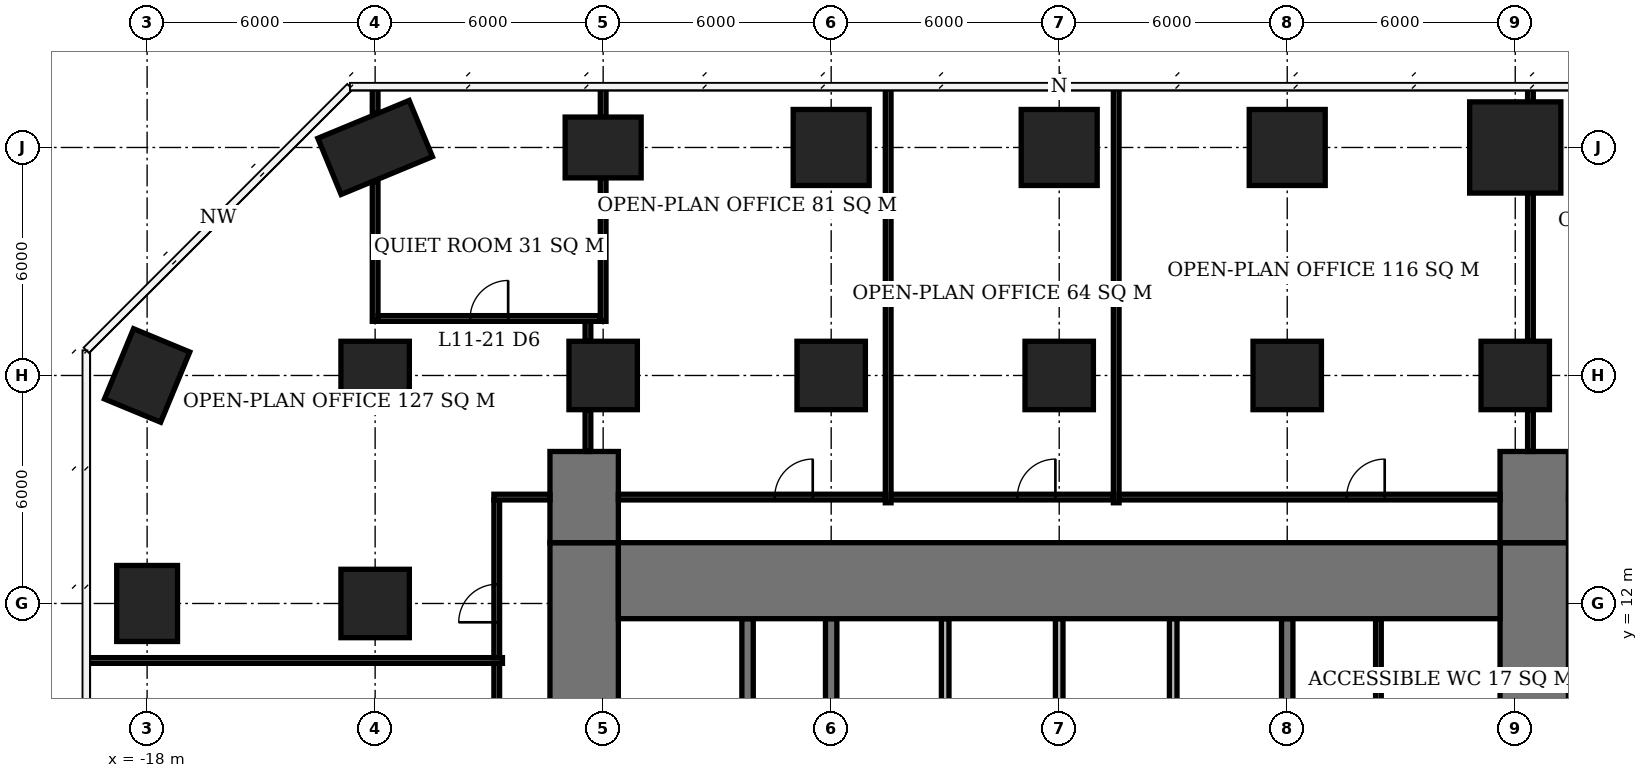
"""IFC4 building model, lengths in metres.
Left out: names, types, materials, properties, quantities, classifications, styles, units other than length and angle.
Written with IfcOpenShell. Run it as: python <this file> out.ifc"""

import sys

from ifc_helpers import new_model, si_unit, direction, frame, frame_2d, origin, origin_2d, place, context, subcontext, project, spatial, rectangle, extrude, element, fill, save


model = new_model("IFC4")
c1 = context("Model", 3, precision=1e-05, world=origin(), true_north=direction((0.0, 1.0)))
c2 = subcontext(c1, "Body", "Model", "MODEL_VIEW")
j1 = project(units=[si_unit("LENGTHUNIT", "METRE"), si_unit("PLANEANGLEUNIT", "RADIAN")], contexts=[c1])
p1 = place(None, origin())
s1 = spatial("IfcSite", under=j1, at=p1, CompositionType="ELEMENT")
p2 = place(p1, origin())
s2 = spatial("IfcBuilding", under=s1, at=p2, CompositionType="ELEMENT")
p3 = place(p2, frame((0.0, 0.0, 49.4)))
s3 = spatial("IfcBuildingStorey", under=s2, at=p3, CompositionType="ELEMENT", Elevation=49.4)
for number, where, z_axis, x_axis in (
    (1, (-18.0, 12.0, 0.0), (0.0, 0.0, 1.0), (0.0, 1.0, 0.0)),
    (2, (-18.0, 18.0, 0.0), (0.0, 0.0, 1.0), (0.383, 0.924, 0.0)),
):
    element("IfcColumn", number, at=place(p3, frame(where, z_axis=z_axis, x_axis=x_axis)), inside=s3, PredefinedType="COLUMN", context=c2, shape_type="SweptSolid", body=[
        extrude(rectangle(XDim=2.0, YDim=1.6, at=origin_2d()), origin(), (0.0, 0.0, 1.0), 3.9),
    ])
for number, where, z_axis, x_axis in (
    (3, (-12.0, 12.0, 0.0), (0.0, 0.0, 1.0), (1.0, 0.0, 0.0)),
    (4, (-12.0, 18.0, 0.0), (0.0, 0.0, 1.0), (1.0, 0.0, 0.0)),
):
    element("IfcColumn", number, at=place(p3, frame(where, z_axis=z_axis, x_axis=x_axis)), inside=s3, PredefinedType="COLUMN", context=c2, shape_type="SweptSolid", body=[
        extrude(rectangle(XDim=1.8, YDim=1.8, at=origin_2d()), origin(), (0.0, 0.0, 1.0), 3.9),
    ])
p4 = place(p3, frame((-12.0, 24.0, 0.0), z_axis=(0.0, 0.0, 1.0), x_axis=(0.923879532511, 0.382683432365, 0.0)))
e5 = element("IfcColumn", 5, at=p4, inside=s3, PredefinedType="COLUMN", context=c2, shape_type="SweptSolid", body=[
    extrude(rectangle(XDim=2.6, YDim=1.6, at=origin_2d()), origin(), (0.0, 0.0, 1.0), 3.9),
])
p5 = place(p3, frame((-6.0, 18.0, 0.0), z_axis=(0.0, 0.0, 1.0), x_axis=(1.0, 0.0, 0.0)))
e6 = element("IfcColumn", 6, at=p5, inside=s3, PredefinedType="COLUMN", context=c2, shape_type="SweptSolid", body=[
    extrude(rectangle(XDim=1.8, YDim=1.8, at=origin_2d()), origin(), (0.0, 0.0, 1.0), 3.9),
])
p6 = place(p3, frame((-6.0, 24.0, 0.0), z_axis=(0.0, 0.0, 1.0), x_axis=(1.0, 0.0, 0.0)))
e7 = element("IfcColumn", 7, at=p6, inside=s3, PredefinedType="COLUMN", context=c2, shape_type="SweptSolid", body=[
    extrude(rectangle(XDim=2.0, YDim=1.6, at=origin_2d()), origin(), (0.0, 0.0, 1.0), 3.9),
])
p7 = place(p3, frame((0.0, 18.0, 0.0), z_axis=(0.0, 0.0, 1.0), x_axis=(1.0, 0.0, 0.0)))
e8 = element("IfcColumn", 8, at=p7, inside=s3, PredefinedType="COLUMN", context=c2, shape_type="SweptSolid", body=[
    extrude(rectangle(XDim=1.8, YDim=1.8, at=origin_2d()), origin(), (0.0, 0.0, 1.0), 3.9),
])
p8 = place(p3, frame((0.0, 24.0, 0.0), z_axis=(0.0, 0.0, 1.0), x_axis=(1.0, 0.0, 0.0)))
e9 = element("IfcColumn", 9, at=p8, inside=s3, PredefinedType="COLUMN", context=c2, shape_type="SweptSolid", body=[
    extrude(rectangle(XDim=2.0, YDim=2.0, at=origin_2d()), origin(), (0.0, 0.0, 1.0), 3.9),
])
p9 = place(p3, frame((6.0, 18.0, 0.0), z_axis=(0.0, 0.0, 1.0), x_axis=(1.0, 0.0, 0.0)))
e10 = element("IfcColumn", 10, at=p9, inside=s3, PredefinedType="COLUMN", context=c2, shape_type="SweptSolid", body=[
    extrude(rectangle(XDim=1.8, YDim=1.8, at=origin_2d()), origin(), (0.0, 0.0, 1.0), 3.9),
])
p10 = place(p3, frame((6.0, 24.0, 0.0), z_axis=(0.0, 0.0, 1.0), x_axis=(1.0, 0.0, 0.0)))
e11 = element("IfcColumn", 11, at=p10, inside=s3, PredefinedType="COLUMN", context=c2, shape_type="SweptSolid", body=[
    extrude(rectangle(XDim=2.0, YDim=2.0, at=origin_2d()), origin(), (0.0, 0.0, 1.0), 3.9),
])
p11 = place(p3, frame((12.0, 18.0, 0.0), z_axis=(0.0, 0.0, 1.0), x_axis=(1.0, 0.0, 0.0)))
e12 = element("IfcColumn", 12, at=p11, inside=s3, PredefinedType="COLUMN", context=c2, shape_type="SweptSolid", body=[
    extrude(rectangle(XDim=1.8, YDim=1.8, at=origin_2d()), origin(), (0.0, 0.0, 1.0), 3.9),
])
p12 = place(p3, frame((12.0, 24.0, 0.0), z_axis=(0.0, 0.0, 1.0), x_axis=(1.0, 0.0, 0.0)))
e13 = element("IfcColumn", 13, at=p12, inside=s3, PredefinedType="COLUMN", context=c2, shape_type="SweptSolid", body=[
    extrude(rectangle(XDim=2.0, YDim=2.0, at=origin_2d()), origin(), (0.0, 0.0, 1.0), 3.9),
])
p13 = place(p3, frame((18.0, 18.0, 0.0), z_axis=(0.0, 0.0, 1.0), x_axis=(1.0, 0.0, 0.0)))
e14 = element("IfcColumn", 14, at=p13, inside=s3, PredefinedType="COLUMN", context=c2, shape_type="SweptSolid", body=[
    extrude(rectangle(XDim=1.8, YDim=1.8, at=origin_2d()), origin(), (0.0, 0.0, 1.0), 3.9),
])
p14 = place(p3, frame((18.0, 24.0, 0.0), z_axis=(0.0, 0.0, 1.0), x_axis=(1.0, 0.0, 0.0)))
e15 = element("IfcColumn", 15, at=p14, inside=s3, PredefinedType="COLUMN", context=c2, shape_type="SweptSolid", body=[
    extrude(rectangle(XDim=2.4, YDim=2.4, at=origin_2d()), origin(), (0.0, 0.0, 1.0), 3.9),
])
p15 = place(p3, frame((-5.6, 12.6, 0.0), z_axis=(0.0, 0.0, 1.0), x_axis=(1.0, 0.0, 0.0)))
e16 = element("IfcWall", 16, at=p15, inside=s3, PredefinedType="SHEAR", context=c2, shape_type="SweptSolid", body=[
    extrude(rectangle(XDim=23.2, YDim=2.0, at=frame_2d((11.6, 0.0))), origin(), (0.0, 0.0, 1.0), 3.9),
])
p16 = place(p3, frame((-6.5, -7.6, 0.0), z_axis=(0.0, 0.0, 1.0), x_axis=(0.0, 1.0, 0.0)))
e17 = element("IfcWall", 17, at=p16, inside=s3, PredefinedType="SHEAR", context=c2, shape_type="SweptSolid", body=[
    extrude(rectangle(XDim=21.2, YDim=1.8, at=frame_2d((10.6, 0.0))), origin(), (0.0, 0.0, 1.0), 3.9),
])
p17 = place(p16, frame((7.8, 0.0, 0.0)))
e18 = element("IfcOpeningElement", 18, at=p17, cuts=e17, PredefinedType="OPENING", context=c2, shape_type="SweptSolid", body=[
    extrude(rectangle(XDim=1.8, YDim=2.4, at=frame_2d((0.9, 1.2))), frame((0.0, 0.91, 0.0), z_axis=(0.0, -1.0, 0.0), x_axis=(1.0, 0.0, 0.0)), (0.0, 0.0, 1.0), 1.82),
])
p18 = place(p3, frame((18.5, -7.6, 0.0), z_axis=(0.0, 0.0, 1.0), x_axis=(0.0, 1.0, 0.0)))
e19 = element("IfcWall", 19, at=p18, inside=s3, PredefinedType="SHEAR", context=c2, shape_type="SweptSolid", body=[
    extrude(rectangle(XDim=21.2, YDim=1.8, at=frame_2d((10.6, 0.0))), origin(), (0.0, 0.0, 1.0), 3.9),
])
p19 = place(p18, frame((9.2, 0.0, 0.0)))
e20 = element("IfcOpeningElement", 20, at=p19, cuts=e19, PredefinedType="OPENING", context=c2, shape_type="SweptSolid", body=[
    extrude(rectangle(XDim=1.8, YDim=2.4, at=frame_2d((0.9, 1.2))), frame((0.0, 0.91, 0.0), z_axis=(0.0, -1.0, 0.0), x_axis=(1.0, 0.0, 0.0)), (0.0, 0.0, 1.0), 1.82),
])
for number, where, z_axis, x_axis in (
    (21, (-6.5, 13.6, 0.0), (0.0, 0.0, 1.0), (0.0, 1.0, 0.0)),
    (22, (18.5, 13.6, 0.0), (0.0, 0.0, 1.0), (0.0, 1.0, 0.0)),
):
    element("IfcWall", number, at=place(p3, frame(where, z_axis=z_axis, x_axis=x_axis)), inside=s3, PredefinedType="SHEAR", context=c2, shape_type="SweptSolid", body=[
        extrude(rectangle(XDim=2.4, YDim=1.8, at=frame_2d((1.2, 0.0))), origin(), (0.0, 0.0, 1.0), 3.9),
    ])
p20 = place(p3, frame((0.0, 3.15, 0.0), z_axis=(0.0, 0.0, 1.0), x_axis=(0.0, 1.0, 0.0)))
e23 = element("IfcWall", 23, at=p20, inside=s3, PredefinedType="SHEAR", context=c2, shape_type="SweptSolid", body=[
    extrude(rectangle(XDim=8.45, YDim=0.3, at=frame_2d((4.225, 0.0))), origin(), (0.0, 0.0, 1.0), 3.9),
])
p21 = place(p3, frame((12.0, 6.15, 0.0), z_axis=(0.0, 0.0, 1.0), x_axis=(0.0, 1.0, 0.0)))
e24 = element("IfcWall", 24, at=p21, inside=s3, PredefinedType="SHEAR", context=c2, shape_type="SweptSolid", body=[
    extrude(rectangle(XDim=5.45, YDim=0.3, at=frame_2d((2.725, 0.0))), origin(), (0.0, 0.0, 1.0), 3.9),
])
p22 = place(p3, frame((-2.2, 3.15, 0.0), z_axis=(0.0, 0.0, 1.0), x_axis=(0.0, 1.0, 0.0)))
e25 = element("IfcWall", 25, at=p22, inside=s3, PredefinedType="SHEAR", context=c2, shape_type="SweptSolid", body=[
    extrude(rectangle(XDim=8.45, YDim=0.3, at=frame_2d((4.225, 0.0))), origin(), (0.0, 0.0, 1.0), 3.9),
])
for number, where, z_axis, x_axis in (
    (26, (3.0, 6.15, 0.0), (0.0, 0.0, 1.0), (0.0, 1.0, 0.0)),
    (27, (6.0, 6.15, 0.0), (0.0, 0.0, 1.0), (0.0, 1.0, 0.0)),
    (28, (9.0, 6.15, 0.0), (0.0, 0.0, 1.0), (0.0, 1.0, 0.0)),
):
    element("IfcWall", number, at=place(p3, frame(where, z_axis=z_axis, x_axis=x_axis)), inside=s3, PredefinedType="SOLIDWALL", context=c2, shape_type="SweptSolid", body=[
        extrude(rectangle(XDim=5.45, YDim=0.2, at=frame_2d((2.725, 0.0))), origin(), (0.0, 0.0, 1.0), 3.9),
    ])
p23 = place(p3, frame((14.4, 6.15, 0.0), z_axis=(0.0, 0.0, 1.0), x_axis=(0.0, 1.0, 0.0)))
e29 = element("IfcWall", 29, at=p23, inside=s3, PredefinedType="PLUMBINGWALL", context=c2, shape_type="SweptSolid", body=[
    extrude(rectangle(XDim=5.45, YDim=0.15, at=frame_2d((2.725, 0.0))), origin(), (0.0, 0.0, 1.0), 3.65),
])
p24 = place(p3, frame((-11.925, 19.5, 0.0), z_axis=(0.0, 0.0, 1.0), x_axis=(1.0, 0.0, 0.0)))
e30 = element("IfcWall", 30, at=p24, inside=s3, PredefinedType="PARTITIONING", context=c2, shape_type="SweptSolid", body=[
    extrude(rectangle(XDim=5.85, YDim=0.15, at=frame_2d((2.925, 0.0))), origin(), (0.0, 0.0, 1.0), 3.65),
])
p25 = place(p24, frame((2.425, 0.0, 0.0)))
e31 = element("IfcOpeningElement", 31, at=p25, cuts=e30, PredefinedType="OPENING", context=c2, shape_type="SweptSolid", body=[
    extrude(rectangle(XDim=1.0, YDim=2.1, at=frame_2d((0.5, 1.05))), frame((0.0, 0.085, 0.0), z_axis=(0.0, -1.0, 0.0), x_axis=(1.0, 0.0, 0.0)), (0.0, 0.0, 1.0), 0.17),
])
p26 = place(p3, frame((-12.0, 19.425, 0.0), z_axis=(0.0, 0.0, 1.0), x_axis=(0.0, 1.0, 0.0)))
e32 = element("IfcWall", 32, at=p26, inside=s3, PredefinedType="PARTITIONING", context=c2, shape_type="SweptSolid", body=[
    extrude(rectangle(XDim=3.678, YDim=0.15, at=frame_2d((1.839, 0.0))), origin(), (0.0, 0.0, 1.0), 3.65),
])
p27 = place(p3, frame((-12.0, 24.897, 0.0), z_axis=(0.0, 0.0, 1.0), x_axis=(0.0, 1.0, 0.0)))
e33 = element("IfcWall", 33, at=p27, inside=s3, PredefinedType="PARTITIONING", context=c2, shape_type="SweptSolid", body=[
    extrude(rectangle(XDim=0.703, YDim=0.15, at=frame_2d((0.352, 0.0))), origin(), (0.0, 0.0, 1.0), 3.65),
])
p28 = place(p3, frame((-6.0, 19.425, 0.0), z_axis=(0.0, 0.0, 1.0), x_axis=(0.0, 1.0, 0.0)))
e34 = element("IfcWall", 34, at=p28, inside=s3, PredefinedType="PARTITIONING", context=c2, shape_type="SweptSolid", body=[
    extrude(rectangle(XDim=3.775, YDim=0.15, at=frame_2d((1.887, 0.0))), origin(), (0.0, 0.0, 1.0), 3.65),
])
p29 = place(p3, frame((-6.0, 24.8, 0.0), z_axis=(0.0, 0.0, 1.0), x_axis=(0.0, 1.0, 0.0)))
e35 = element("IfcWall", 35, at=p29, inside=s3, PredefinedType="PARTITIONING", context=c2, shape_type="SweptSolid", body=[
    extrude(rectangle(XDim=0.8, YDim=0.15, at=frame_2d((0.4, 0.0))), origin(), (0.0, 0.0, 1.0), 3.65),
])
p30 = place(p3, frame((-19.6, 10.5, 0.0), z_axis=(0.0, 0.0, 1.0), x_axis=(1.0, 0.0, 0.0)))
e36 = element("IfcWall", 36, at=p30, inside=s3, PredefinedType="PARTITIONING", context=c2, shape_type="SweptSolid", body=[
    extrude(rectangle(XDim=10.95, YDim=0.15, at=frame_2d((5.475, 0.0))), origin(), (0.0, 0.0, 1.0), 3.65),
])
p31 = place(p3, frame((-8.8, 4.575, 0.0), z_axis=(0.0, 0.0, 1.0), x_axis=(0.0, 1.0, 0.0)))
e37 = element("IfcWall", 37, at=p31, inside=s3, PredefinedType="PARTITIONING", context=c2, shape_type="SweptSolid", body=[
    extrude(rectangle(XDim=5.85, YDim=0.15, at=frame_2d((2.925, 0.0))), origin(), (0.0, 0.0, 1.0), 3.65),
])
p32 = place(p31, frame((1.525, 0.0, 0.0)))
e38 = element("IfcOpeningElement", 38, at=p32, cuts=e37, PredefinedType="OPENING", context=c2, shape_type="SweptSolid", body=[
    extrude(rectangle(XDim=1.0, YDim=2.1, at=frame_2d((0.5, 1.05))), frame((0.0, 0.085, 0.0), z_axis=(0.0, -1.0, 0.0), x_axis=(1.0, 0.0, 0.0)), (0.0, 0.0, 1.0), 0.17),
])
p33 = place(p3, frame((-8.8, 10.575, 0.0), z_axis=(0.0, 0.0, 1.0), x_axis=(0.0, 1.0, 0.0)))
e39 = element("IfcWall", 39, at=p33, inside=s3, PredefinedType="PARTITIONING", context=c2, shape_type="SweptSolid", body=[
    extrude(rectangle(XDim=4.15, YDim=0.15, at=frame_2d((2.075, 0.0))), origin(), (0.0, 0.0, 1.0), 3.65),
])
p34 = place(p33, frame((0.93, 0.0, 0.0)))
e40 = element("IfcOpeningElement", 40, at=p34, cuts=e39, PredefinedType="OPENING", context=c2, shape_type="SweptSolid", body=[
    extrude(rectangle(XDim=1.0, YDim=2.1, at=frame_2d((0.5, 1.05))), frame((0.0, 0.085, 0.0), z_axis=(0.0, -1.0, 0.0), x_axis=(1.0, 0.0, 0.0)), (0.0, 0.0, 1.0), 0.17),
])
p35 = place(p3, frame((-8.875, 14.8, 0.0), z_axis=(0.0, 0.0, 1.0), x_axis=(1.0, 0.0, 0.0)))
e41 = element("IfcWall", 41, at=p35, inside=s3, PredefinedType="PARTITIONING", context=c2, shape_type="SweptSolid", body=[
    extrude(rectangle(XDim=1.475, YDim=0.15, at=frame_2d((0.738, 0.0))), origin(), (0.0, 0.0, 1.0), 3.65),
])
p36 = place(p3, frame((-6.4, 16.0, 0.0), z_axis=(0.0, 0.0, 1.0), x_axis=(0.0, 1.0, 0.0)))
e42 = element("IfcWall", 42, at=p36, inside=s3, PredefinedType="PARTITIONING", context=c2, shape_type="SweptSolid", body=[
    extrude(rectangle(XDim=1.1, YDim=0.15, at=frame_2d((0.55, 0.0))), origin(), (0.0, 0.0, 1.0), 3.65),
])
p37 = place(p3, frame((-6.4, 18.9, 0.0), z_axis=(0.0, 0.0, 1.0), x_axis=(0.0, 1.0, 0.0)))
e43 = element("IfcWall", 43, at=p37, inside=s3, PredefinedType="PARTITIONING", context=c2, shape_type="SweptSolid", body=[
    extrude(rectangle(XDim=0.525, YDim=0.15, at=frame_2d((0.263, 0.0))), origin(), (0.0, 0.0, 1.0), 3.65),
])
p38 = place(p3, frame((-5.6, 14.8, 0.0), z_axis=(0.0, 0.0, 1.0), x_axis=(1.0, 0.0, 0.0)))
e44 = element("IfcWall", 44, at=p38, inside=s3, PredefinedType="PARTITIONING", context=c2, shape_type="SweptSolid", body=[
    extrude(rectangle(XDim=7.025, YDim=0.15, at=frame_2d((3.513, 0.0))), origin(), (0.0, 0.0, 1.0), 3.65),
])
p39 = place(p38, frame((4.115, 0.0, 0.0)))
e45 = element("IfcOpeningElement", 45, at=p39, cuts=e44, PredefinedType="OPENING", context=c2, shape_type="SweptSolid", body=[
    extrude(rectangle(XDim=1.0, YDim=2.1, at=frame_2d((0.5, 1.05))), frame((0.0, 0.085, 0.0), z_axis=(0.0, -1.0, 0.0), x_axis=(1.0, 0.0, 0.0)), (0.0, 0.0, 1.0), 0.17),
])
p40 = place(p3, frame((1.5, 14.65, 0.0), z_axis=(0.0, 0.0, 1.0), x_axis=(0.0, 1.0, 0.0)))
e46 = element("IfcWall", 46, at=p40, inside=s3, PredefinedType="PARTITIONING", context=c2, shape_type="SweptSolid", body=[
    extrude(rectangle(XDim=10.95, YDim=0.15, at=frame_2d((5.475, 0.0))), origin(), (0.0, 0.0, 1.0), 3.65),
])
p41 = place(p3, frame((1.575, 14.8, 0.0), z_axis=(0.0, 0.0, 1.0), x_axis=(1.0, 0.0, 0.0)))
e47 = element("IfcWall", 47, at=p41, inside=s3, PredefinedType="PARTITIONING", context=c2, shape_type="SweptSolid", body=[
    extrude(rectangle(XDim=5.85, YDim=0.15, at=frame_2d((2.925, 0.0))), origin(), (0.0, 0.0, 1.0), 3.65),
])
p42 = place(p41, frame((3.325, 0.0, 0.0)))
e48 = element("IfcOpeningElement", 48, at=p42, cuts=e47, PredefinedType="OPENING", context=c2, shape_type="SweptSolid", body=[
    extrude(rectangle(XDim=1.0, YDim=2.1, at=frame_2d((0.5, 1.05))), frame((0.0, 0.085, 0.0), z_axis=(0.0, -1.0, 0.0), x_axis=(1.0, 0.0, 0.0)), (0.0, 0.0, 1.0), 0.17),
])
p43 = place(p3, frame((7.5, 14.65, 0.0), z_axis=(0.0, 0.0, 1.0), x_axis=(0.0, 1.0, 0.0)))
e49 = element("IfcWall", 49, at=p43, inside=s3, PredefinedType="PARTITIONING", context=c2, shape_type="SweptSolid", body=[
    extrude(rectangle(XDim=10.95, YDim=0.15, at=frame_2d((5.475, 0.0))), origin(), (0.0, 0.0, 1.0), 3.65),
])
p44 = place(p3, frame((7.575, 14.8, 0.0), z_axis=(0.0, 0.0, 1.0), x_axis=(1.0, 0.0, 0.0)))
e50 = element("IfcWall", 50, at=p44, inside=s3, PredefinedType="PARTITIONING", context=c2, shape_type="SweptSolid", body=[
    extrude(rectangle(XDim=10.025, YDim=0.15, at=frame_2d((5.013, 0.0))), origin(), (0.0, 0.0, 1.0), 3.65),
])
p45 = place(p44, frame((5.99, 0.0, 0.0)))
e51 = element("IfcOpeningElement", 51, at=p45, cuts=e50, PredefinedType="OPENING", context=c2, shape_type="SweptSolid", body=[
    extrude(rectangle(XDim=1.0, YDim=2.1, at=frame_2d((0.5, 1.05))), frame((0.0, 0.085, 0.0), z_axis=(0.0, -1.0, 0.0), x_axis=(1.0, 0.0, 0.0)), (0.0, 0.0, 1.0), 0.17),
])
p46 = place(p3, frame((18.4, 16.0, 0.0), z_axis=(0.0, 0.0, 1.0), x_axis=(0.0, 1.0, 0.0)))
e52 = element("IfcWall", 52, at=p46, inside=s3, PredefinedType="PARTITIONING", context=c2, shape_type="SweptSolid", body=[
    extrude(rectangle(XDim=1.1, YDim=0.15, at=frame_2d((0.55, 0.0))), origin(), (0.0, 0.0, 1.0), 3.65),
])
p47 = place(p3, frame((18.4, 18.9, 0.0), z_axis=(0.0, 0.0, 1.0), x_axis=(0.0, 1.0, 0.0)))
e53 = element("IfcWall", 53, at=p47, inside=s3, PredefinedType="PARTITIONING", context=c2, shape_type="SweptSolid", body=[
    extrude(rectangle(XDim=3.9, YDim=0.15, at=frame_2d((1.95, 0.0))), origin(), (0.0, 0.0, 1.0), 3.65),
])
p48 = place(p3, frame((18.4, 25.2, 0.0), z_axis=(0.0, 0.0, 1.0), x_axis=(0.0, 1.0, 0.0)))
e54 = element("IfcWall", 54, at=p48, inside=s3, PredefinedType="PARTITIONING", context=c2, shape_type="SweptSolid", body=[
    extrude(rectangle(XDim=0.35, YDim=0.15, at=frame_2d((0.175, 0.0))), origin(), (0.0, 0.0, 1.0), 3.65),
])
p49 = place(p25, origin())
e55 = element("IfcDoor", 55, at=p49, inside=s3, OperationType="SINGLE_SWING_RIGHT", PredefinedType="DOOR", context=c2, shape_type="SweptSolid", body=[
    extrude(rectangle(XDim=1.0, YDim=2.1, at=frame_2d((0.5, 1.05))), frame((0.0, 0.025, 0.0), z_axis=(0.0, -1.0, 0.0), x_axis=(1.0, 0.0, 0.0)), (0.0, 0.0, 1.0), 0.05),
])
fill(e31, e55)
p50 = place(p34, origin())
e56 = element("IfcDoor", 56, at=p50, inside=s3, OperationType="SINGLE_SWING_LEFT", PredefinedType="DOOR", context=c2, shape_type="SweptSolid", body=[
    extrude(rectangle(XDim=1.0, YDim=2.1, at=frame_2d((0.5, 1.05))), frame((0.0, 0.025, 0.0), z_axis=(0.0, -1.0, 0.0), x_axis=(1.0, 0.0, 0.0)), (0.0, 0.0, 1.0), 0.05),
])
fill(e40, e56)
p51 = place(p39, origin())
e57 = element("IfcDoor", 57, at=p51, inside=s3, OperationType="SINGLE_SWING_RIGHT", PredefinedType="DOOR", context=c2, shape_type="SweptSolid", body=[
    extrude(rectangle(XDim=1.0, YDim=2.1, at=frame_2d((0.5, 1.05))), frame((0.0, 0.025, 0.0), z_axis=(0.0, -1.0, 0.0), x_axis=(1.0, 0.0, 0.0)), (0.0, 0.0, 1.0), 0.05),
])
fill(e45, e57)
p52 = place(p42, origin())
e58 = element("IfcDoor", 58, at=p52, inside=s3, OperationType="SINGLE_SWING_RIGHT", PredefinedType="DOOR", context=c2, shape_type="SweptSolid", body=[
    extrude(rectangle(XDim=1.0, YDim=2.1, at=frame_2d((0.5, 1.05))), frame((0.0, 0.025, 0.0), z_axis=(0.0, -1.0, 0.0), x_axis=(1.0, 0.0, 0.0)), (0.0, 0.0, 1.0), 0.05),
])
fill(e48, e58)
p53 = place(p45, origin())
e59 = element("IfcDoor", 59, at=p53, inside=s3, OperationType="SINGLE_SWING_RIGHT", PredefinedType="DOOR", context=c2, shape_type="SweptSolid", body=[
    extrude(rectangle(XDim=1.0, YDim=2.1, at=frame_2d((0.5, 1.05))), frame((0.0, 0.025, 0.0), z_axis=(0.0, -1.0, 0.0), x_axis=(1.0, 0.0, 0.0)), (0.0, 0.0, 1.0), 0.05),
])
fill(e51, e59)
save(model, sys.argv[1])
